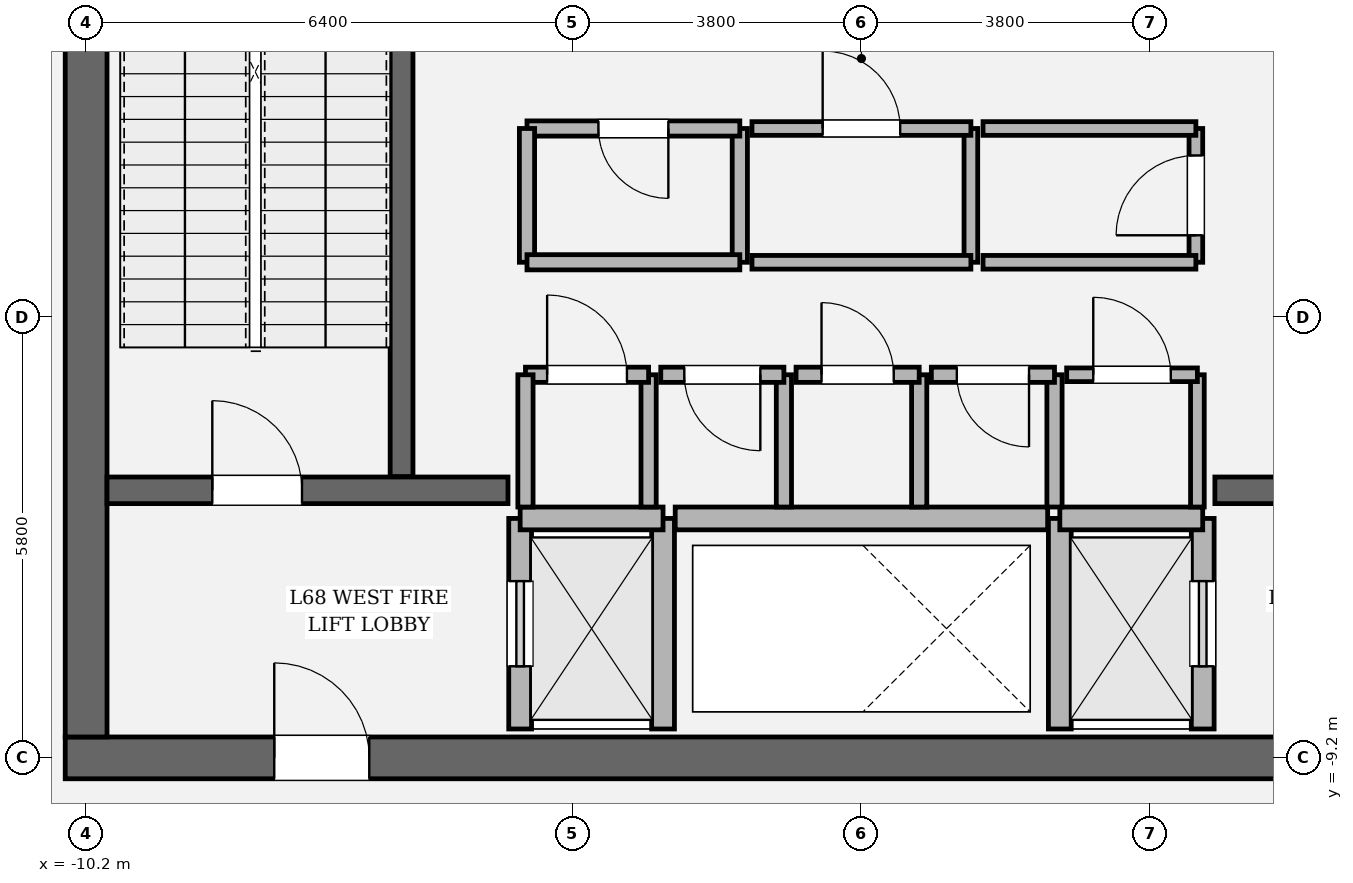
"""IFC4 building model, lengths in metres.
Left out: names, types, materials, properties, quantities, classifications, styles, units other than length and angle.
Written with IfcOpenShell. Run it as: python <this file> out.ifc"""

import sys

from ifc_helpers import new_model, si_unit, direction, frame, frame_2d, origin, place, context, subcontext, project, spatial, rectangle, extrude, element, fill, save


model = new_model("IFC4")
c1 = context("Model", 3, precision=1e-05, world=origin(), true_north=direction((0.0, 1.0)))
c2 = subcontext(c1, "Body", "Model", "MODEL_VIEW")
j1 = project(units=[si_unit("LENGTHUNIT", "METRE"), si_unit("PLANEANGLEUNIT", "RADIAN")], contexts=[c1])
p1 = place(None, origin())
s1 = spatial("IfcSite", under=j1, at=p1, CompositionType="ELEMENT")
p2 = place(p1, origin())
s2 = spatial("IfcBuilding", under=s1, at=p2, CompositionType="ELEMENT")
p3 = place(p2, frame((0.0, 0.0, 288.0)))
s3 = spatial("IfcBuildingStorey", under=s2, at=p3, CompositionType="ELEMENT", Elevation=288.0)
p4 = place(p3, frame((10.475, -9.2, 0.0), z_axis=(0.0, 0.0, 1.0), x_axis=(-1.0, 0.0, 0.0)))
e1 = element("IfcWall", 1, at=p4, inside=s3, PredefinedType="SHEAR", context=c2, shape_type="SweptSolid", body=[
    extrude(rectangle(XDim=20.95, YDim=0.55, at=frame_2d((10.475, 0.0))), origin(), (0.0, 0.0, 1.0), 4.2),
])
p5 = place(p4, frame((2.75, 0.0, 0.0)))
e2 = element("IfcOpeningElement", 2, at=p5, cuts=e1, PredefinedType="OPENING", context=c2, shape_type="SweptSolid", body=[
    extrude(rectangle(XDim=1.25, YDim=2.25, at=frame_2d((0.625, 1.125))), frame((0.0, 0.285, 0.0), z_axis=(0.0, -1.0, 0.0), x_axis=(1.0, 0.0, 0.0)), (0.0, 0.0, 1.0), 0.57),
])
p6 = place(p4, frame((16.95, 0.0, 0.0)))
e3 = element("IfcOpeningElement", 3, at=p6, cuts=e1, PredefinedType="OPENING", context=c2, shape_type="SweptSolid", body=[
    extrude(rectangle(XDim=1.25, YDim=2.25, at=frame_2d((0.625, 1.125))), frame((0.0, 0.285, 0.0), z_axis=(0.0, -1.0, 0.0), x_axis=(1.0, 0.0, 0.0)), (0.0, 0.0, 1.0), 0.57),
])
p7 = place(p3, frame((-10.2, -8.925, 0.0), z_axis=(0.0, 0.0, 1.0), x_axis=(0.0, 1.0, 0.0)))
e4 = element("IfcWall", 4, at=p7, inside=s3, PredefinedType="SHEAR", context=c2, shape_type="SweptSolid", body=[
    extrude(rectangle(XDim=17.85, YDim=0.55, at=frame_2d((8.925, 0.0))), origin(), (0.0, 0.0, 1.0), 4.2),
])
p8 = place(p7, frame((12.715, 0.0, 0.0)))
e5 = element("IfcOpeningElement", 5, at=p8, cuts=e4, PredefinedType="OPENING", context=c2, shape_type="SweptSolid", body=[
    extrude(rectangle(XDim=1.18, YDim=2.2, at=frame_2d((0.59, 1.1))), frame((0.0, 0.285, 0.0), z_axis=(0.0, -1.0, 0.0), x_axis=(1.0, 0.0, 0.0)), (0.0, 0.0, 1.0), 0.57),
])
p9 = place(p3, frame((-6.05, -5.5, 0.0), z_axis=(0.0, 0.0, 1.0), x_axis=(0.0, 1.0, 0.0)))
e6 = element("IfcWall", 6, at=p9, inside=s3, PredefinedType="SOLIDWALL", context=c2, shape_type="SweptSolid", body=[
    extrude(rectangle(XDim=8.95, YDim=0.3, at=frame_2d((4.475, 0.0))), origin(), (0.0, 0.0, 1.0), 4.2),
])
p10 = place(p3, frame((-9.925, -5.68, 0.0), z_axis=(0.0, 0.0, 1.0), x_axis=(1.0, 0.0, 0.0)))
e7 = element("IfcWall", 7, at=p10, inside=s3, PredefinedType="SOLIDWALL", context=c2, shape_type="SweptSolid", body=[
    extrude(rectangle(XDim=5.275, YDim=0.35, at=frame_2d((2.638, 0.0))), origin(), (0.0, 0.0, 1.0), 4.2),
])
p11 = place(p10, frame((1.385, 0.0, 0.0)))
e8 = element("IfcOpeningElement", 8, at=p11, cuts=e7, PredefinedType="OPENING", context=c2, shape_type="SweptSolid", body=[
    extrude(rectangle(XDim=1.18, YDim=2.2, at=frame_2d((0.59, 1.1))), frame((0.0, 0.185, 0.0), z_axis=(0.0, -1.0, 0.0), x_axis=(1.0, 0.0, 0.0)), (0.0, 0.0, 1.0), 0.37),
])
p12 = place(p3, frame((4.65, -5.68, 0.0), z_axis=(0.0, 0.0, 1.0), x_axis=(1.0, 0.0, 0.0)))
e9 = element("IfcWall", 9, at=p12, inside=s3, PredefinedType="SOLIDWALL", context=c2, shape_type="SweptSolid", body=[
    extrude(rectangle(XDim=5.275, YDim=0.35, at=frame_2d((2.638, 0.0))), origin(), (0.0, 0.0, 1.0), 4.2),
])
p13 = place(p12, frame((2.71, 0.0, 0.0)))
e10 = element("IfcOpeningElement", 10, at=p13, cuts=e9, PredefinedType="OPENING", context=c2, shape_type="SweptSolid", body=[
    extrude(rectangle(XDim=1.18, YDim=2.2, at=frame_2d((0.59, 1.1))), frame((0.0, 0.185, 0.0), z_axis=(0.0, -1.0, 0.0), x_axis=(1.0, 0.0, 0.0)), (0.0, 0.0, 1.0), 0.37),
])
p14 = place(p3, frame((-4.49, -8.82, 0.0), z_axis=(0.0, 0.0, 1.0), x_axis=(0.0, 1.0, 0.0)))
e11 = element("IfcWall", 11, at=p14, inside=s3, PredefinedType="SOLIDWALL", context=c2, shape_type="SweptSolid", body=[
    extrude(rectangle(XDim=2.77, YDim=0.3, at=frame_2d((1.385, 0.0))), origin(), (0.0, 0.0, 1.0), 4.0),
])
p15 = place(p14, frame((0.825, 0.0, 0.0)))
e12 = element("IfcOpeningElement", 12, at=p15, cuts=e11, PredefinedType="OPENING", context=c2, shape_type="SweptSolid", body=[
    extrude(rectangle(XDim=1.12, YDim=2.25, at=frame_2d((0.56, 1.125))), frame((0.0, 0.16, 0.0), z_axis=(0.0, -1.0, 0.0), x_axis=(1.0, 0.0, 0.0)), (0.0, 0.0, 1.0), 0.32),
])
p16 = place(p3, frame((-2.61, -8.82, 0.0), z_axis=(0.0, 0.0, 1.0), x_axis=(0.0, 1.0, 0.0)))
e13 = element("IfcWall", 13, at=p16, inside=s3, PredefinedType="SOLIDWALL", context=c2, shape_type="SweptSolid", body=[
    extrude(rectangle(XDim=2.77, YDim=0.3, at=frame_2d((1.385, 0.0))), origin(), (0.0, 0.0, 1.0), 4.0),
])
p17 = place(p3, frame((-4.49, -6.05, 0.0), z_axis=(0.0, 0.0, 1.0), x_axis=(1.0, 0.0, 0.0)))
e14 = element("IfcWall", 14, at=p17, inside=s3, PredefinedType="SOLIDWALL", context=c2, shape_type="SweptSolid", body=[
    extrude(rectangle(XDim=1.88, YDim=0.3, at=frame_2d((0.94, 0.0))), origin(), (0.0, 0.0, 1.0), 4.0),
])
p18 = place(p3, frame((4.49, -8.82, 0.0), z_axis=(0.0, 0.0, 1.0), x_axis=(0.0, 1.0, 0.0)))
e15 = element("IfcWall", 15, at=p18, inside=s3, PredefinedType="SOLIDWALL", context=c2, shape_type="SweptSolid", body=[
    extrude(rectangle(XDim=2.77, YDim=0.3, at=frame_2d((1.385, 0.0))), origin(), (0.0, 0.0, 1.0), 4.0),
])
p19 = place(p18, frame((0.825, 0.0, 0.0)))
e16 = element("IfcOpeningElement", 16, at=p19, cuts=e15, PredefinedType="OPENING", context=c2, shape_type="SweptSolid", body=[
    extrude(rectangle(XDim=1.12, YDim=2.25, at=frame_2d((0.56, 1.125))), frame((0.0, 0.16, 0.0), z_axis=(0.0, -1.0, 0.0), x_axis=(1.0, 0.0, 0.0)), (0.0, 0.0, 1.0), 0.32),
])
p20 = place(p3, frame((2.61, -8.82, 0.0), z_axis=(0.0, 0.0, 1.0), x_axis=(0.0, 1.0, 0.0)))
e17 = element("IfcWall", 17, at=p20, inside=s3, PredefinedType="SOLIDWALL", context=c2, shape_type="SweptSolid", body=[
    extrude(rectangle(XDim=2.77, YDim=0.3, at=frame_2d((1.385, 0.0))), origin(), (0.0, 0.0, 1.0), 4.0),
])
p21 = place(p3, frame((2.61, -6.05, 0.0), z_axis=(0.0, 0.0, 1.0), x_axis=(1.0, 0.0, 0.0)))
e18 = element("IfcWall", 18, at=p21, inside=s3, PredefinedType="SOLIDWALL", context=c2, shape_type="SweptSolid", body=[
    extrude(rectangle(XDim=1.88, YDim=0.3, at=frame_2d((0.94, 0.0))), origin(), (0.0, 0.0, 1.0), 4.0),
])
p22 = place(p3, frame((-2.45, -6.05, 0.0), z_axis=(0.0, 0.0, 1.0), x_axis=(1.0, 0.0, 0.0)))
e19 = element("IfcWall", 19, at=p22, inside=s3, PredefinedType="SOLIDWALL", context=c2, shape_type="SweptSolid", body=[
    extrude(rectangle(XDim=4.9, YDim=0.3, at=frame_2d((2.45, 0.0))), origin(), (0.0, 0.0, 1.0), 4.0),
])
p23 = place(p3, frame((-2.8, -5.9, 0.0), z_axis=(0.0, 0.0, 1.0), x_axis=(0.0, 1.0, 0.0)))
e20 = element("IfcWall", 20, at=p23, inside=s3, PredefinedType="SOLIDWALL", context=c2, shape_type="SweptSolid", body=[
    extrude(rectangle(XDim=1.74, YDim=0.2, at=frame_2d((0.87, 0.0))), origin(), (0.0, 0.0, 1.0), 4.0),
])
p24 = place(p3, frame((-2.8, -4.16, 0.0), z_axis=(0.0, 0.0, 1.0), x_axis=(-1.0, 0.0, 0.0)))
e21 = element("IfcWall", 21, at=p24, inside=s3, PredefinedType="SOLIDWALL", context=c2, shape_type="SweptSolid", body=[
    extrude(rectangle(XDim=1.62, YDim=0.2, at=frame_2d((0.81, 0.0))), origin(), (0.0, 0.0, 1.0), 4.0),
])
p25 = place(p24, frame((0.285, 0.0, 0.0)))
e22 = element("IfcOpeningElement", 22, at=p25, cuts=e21, PredefinedType="OPENING", context=c2, shape_type="SweptSolid", body=[
    extrude(rectangle(XDim=1.05, YDim=2.2, at=frame_2d((0.525, 1.1))), frame((0.0, 0.11, 0.0), z_axis=(0.0, -1.0, 0.0), x_axis=(1.0, 0.0, 0.0)), (0.0, 0.0, 1.0), 0.22),
])
for number, where, z_axis, x_axis in (
    (23, (-4.42, -4.16, 0.0), (0.0, 0.0, 1.0), (0.0, -1.0, 0.0)),
    (24, (-1.02, -5.9, 0.0), (0.0, 0.0, 1.0), (0.0, 1.0, 0.0)),
):
    element("IfcWall", number, at=place(p3, frame(where, z_axis=z_axis, x_axis=x_axis)), inside=s3, PredefinedType="SOLIDWALL", context=c2, shape_type="SweptSolid", body=[
        extrude(rectangle(XDim=1.74, YDim=0.2, at=frame_2d((0.87, 0.0))), origin(), (0.0, 0.0, 1.0), 4.0),
    ])
p26 = place(p3, frame((-1.02, -4.16, 0.0), z_axis=(0.0, 0.0, 1.0), x_axis=(-1.0, 0.0, 0.0)))
e25 = element("IfcWall", 25, at=p26, inside=s3, PredefinedType="SOLIDWALL", context=c2, shape_type="SweptSolid", body=[
    extrude(rectangle(XDim=1.62, YDim=0.2, at=frame_2d((0.81, 0.0))), origin(), (0.0, 0.0, 1.0), 4.0),
])
p27 = place(p26, frame((0.31, 0.0, 0.0)))
e26 = element("IfcOpeningElement", 26, at=p27, cuts=e25, PredefinedType="OPENING", context=c2, shape_type="SweptSolid", body=[
    extrude(rectangle(XDim=1.0, YDim=2.15, at=frame_2d((0.5, 1.075))), frame((0.0, 0.11, 0.0), z_axis=(0.0, -1.0, 0.0), x_axis=(1.0, 0.0, 0.0)), (0.0, 0.0, 1.0), 0.22),
])
p28 = place(p3, frame((0.76, -5.9, 0.0), z_axis=(0.0, 0.0, 1.0), x_axis=(0.0, 1.0, 0.0)))
e27 = element("IfcWall", 27, at=p28, inside=s3, PredefinedType="SOLIDWALL", context=c2, shape_type="SweptSolid", body=[
    extrude(rectangle(XDim=1.74, YDim=0.2, at=frame_2d((0.87, 0.0))), origin(), (0.0, 0.0, 1.0), 4.0),
])
p29 = place(p3, frame((0.76, -4.16, 0.0), z_axis=(0.0, 0.0, 1.0), x_axis=(-1.0, 0.0, 0.0)))
e28 = element("IfcWall", 28, at=p29, inside=s3, PredefinedType="SOLIDWALL", context=c2, shape_type="SweptSolid", body=[
    extrude(rectangle(XDim=1.62, YDim=0.2, at=frame_2d((0.81, 0.0))), origin(), (0.0, 0.0, 1.0), 4.0),
])
p30 = place(p29, frame((0.335, 0.0, 0.0)))
e29 = element("IfcOpeningElement", 29, at=p30, cuts=e28, PredefinedType="OPENING", context=c2, shape_type="SweptSolid", body=[
    extrude(rectangle(XDim=0.95, YDim=2.15, at=frame_2d((0.475, 1.075))), frame((0.0, 0.11, 0.0), z_axis=(0.0, -1.0, 0.0), x_axis=(1.0, 0.0, 0.0)), (0.0, 0.0, 1.0), 0.22),
])
p31 = place(p3, frame((2.54, -5.9, 0.0), z_axis=(0.0, 0.0, 1.0), x_axis=(0.0, 1.0, 0.0)))
e30 = element("IfcWall", 30, at=p31, inside=s3, PredefinedType="SOLIDWALL", context=c2, shape_type="SweptSolid", body=[
    extrude(rectangle(XDim=1.74, YDim=0.2, at=frame_2d((0.87, 0.0))), origin(), (0.0, 0.0, 1.0), 4.0),
])
p32 = place(p3, frame((2.54, -4.16, 0.0), z_axis=(0.0, 0.0, 1.0), x_axis=(-1.0, 0.0, 0.0)))
e31 = element("IfcWall", 31, at=p32, inside=s3, PredefinedType="SOLIDWALL", context=c2, shape_type="SweptSolid", body=[
    extrude(rectangle(XDim=1.62, YDim=0.2, at=frame_2d((0.81, 0.0))), origin(), (0.0, 0.0, 1.0), 4.0),
])
p33 = place(p32, frame((0.335, 0.0, 0.0)))
e32 = element("IfcOpeningElement", 32, at=p33, cuts=e31, PredefinedType="OPENING", context=c2, shape_type="SweptSolid", body=[
    extrude(rectangle(XDim=0.95, YDim=2.15, at=frame_2d((0.475, 1.075))), frame((0.0, 0.11, 0.0), z_axis=(0.0, -1.0, 0.0), x_axis=(1.0, 0.0, 0.0)), (0.0, 0.0, 1.0), 0.22),
])
p34 = place(p3, frame((4.42, -5.9, 0.0), z_axis=(0.0, 0.0, 1.0), x_axis=(0.0, 1.0, 0.0)))
e33 = element("IfcWall", 33, at=p34, inside=s3, PredefinedType="PARTITIONING", context=c2, shape_type="SweptSolid", body=[
    extrude(rectangle(XDim=1.74, YDim=0.18, at=frame_2d((0.87, 0.0))), origin(), (0.0, 0.0, 1.0), 4.0),
])
p35 = place(p3, frame((4.42, -4.16, 0.0), z_axis=(0.0, 0.0, 1.0), x_axis=(-1.0, 0.0, 0.0)))
e34 = element("IfcWall", 34, at=p35, inside=s3, PredefinedType="PARTITIONING", context=c2, shape_type="SweptSolid", body=[
    extrude(rectangle(XDim=1.72, YDim=0.18, at=frame_2d((0.86, 0.0))), origin(), (0.0, 0.0, 1.0), 4.0),
])
p36 = place(p35, frame((0.35, 0.0, 0.0)))
e35 = element("IfcOpeningElement", 35, at=p36, cuts=e34, PredefinedType="OPENING", context=c2, shape_type="SweptSolid", body=[
    extrude(rectangle(XDim=1.02, YDim=2.2, at=frame_2d((0.51, 1.1))), frame((0.0, 0.1, 0.0), z_axis=(0.0, -1.0, 0.0), x_axis=(1.0, 0.0, 0.0)), (0.0, 0.0, 1.0), 0.2),
])
p37 = place(p3, frame((-1.6, -2.68, 0.0), z_axis=(0.0, 0.0, 1.0), x_axis=(0.0, 1.0, 0.0)))
e36 = element("IfcWall", 36, at=p37, inside=s3, PredefinedType="SOLIDWALL", context=c2, shape_type="SweptSolid", body=[
    extrude(rectangle(XDim=1.76, YDim=0.2, at=frame_2d((0.88, 0.0))), origin(), (0.0, 0.0, 1.0), 4.0),
])
p38 = place(p3, frame((-1.6, -0.92, 0.0), z_axis=(0.0, 0.0, 1.0), x_axis=(-1.0, 0.0, 0.0)))
e37 = element("IfcWall", 37, at=p38, inside=s3, PredefinedType="SOLIDWALL", context=c2, shape_type="SweptSolid", body=[
    extrude(rectangle(XDim=2.8, YDim=0.2, at=frame_2d((1.4, 0.0))), origin(), (0.0, 0.0, 1.0), 4.0),
])
p39 = place(p38, frame((0.94, 0.0, 0.0)))
e38 = element("IfcOpeningElement", 38, at=p39, cuts=e37, PredefinedType="OPENING", context=c2, shape_type="SweptSolid", body=[
    extrude(rectangle(XDim=0.92, YDim=2.1, at=frame_2d((0.46, 1.05))), frame((0.0, 0.11, 0.0), z_axis=(0.0, -1.0, 0.0), x_axis=(1.0, 0.0, 0.0)), (0.0, 0.0, 1.0), 0.22),
])
p40 = place(p3, frame((-4.4, -0.92, 0.0), z_axis=(0.0, 0.0, 1.0), x_axis=(0.0, -1.0, 0.0)))
e39 = element("IfcWall", 39, at=p40, inside=s3, PredefinedType="SOLIDWALL", context=c2, shape_type="SweptSolid", body=[
    extrude(rectangle(XDim=1.76, YDim=0.2, at=frame_2d((0.88, 0.0))), origin(), (0.0, 0.0, 1.0), 4.0),
])
p41 = place(p3, frame((-4.4, -2.68, 0.0), z_axis=(0.0, 0.0, 1.0), x_axis=(1.0, 0.0, 0.0)))
e40 = element("IfcWall", 40, at=p41, inside=s3, PredefinedType="SOLIDWALL", context=c2, shape_type="SweptSolid", body=[
    extrude(rectangle(XDim=2.8, YDim=0.2, at=frame_2d((1.4, 0.0))), origin(), (0.0, 0.0, 1.0), 4.0),
])
p42 = place(p3, frame((1.44, -2.68, 0.0), z_axis=(0.0, 0.0, 1.0), x_axis=(0.0, 1.0, 0.0)))
e41 = element("IfcWall", 41, at=p42, inside=s3, PredefinedType="PARTITIONING", context=c2, shape_type="SweptSolid", body=[
    extrude(rectangle(XDim=1.76, YDim=0.18, at=frame_2d((0.88, 0.0))), origin(), (0.0, 0.0, 1.0), 4.0),
])
p43 = place(p3, frame((1.44, -0.92, 0.0), z_axis=(0.0, 0.0, 1.0), x_axis=(-1.0, 0.0, 0.0)))
e42 = element("IfcWall", 42, at=p43, inside=s3, PredefinedType="PARTITIONING", context=c2, shape_type="SweptSolid", body=[
    extrude(rectangle(XDim=2.88, YDim=0.18, at=frame_2d((1.44, 0.0))), origin(), (0.0, 0.0, 1.0), 4.0),
])
p44 = place(p43, frame((0.93, 0.0, 0.0)))
e43 = element("IfcOpeningElement", 43, at=p44, cuts=e42, PredefinedType="OPENING", context=c2, shape_type="SweptSolid", body=[
    extrude(rectangle(XDim=1.02, YDim=2.2, at=frame_2d((0.51, 1.1))), frame((0.0, 0.1, 0.0), z_axis=(0.0, -1.0, 0.0), x_axis=(1.0, 0.0, 0.0)), (0.0, 0.0, 1.0), 0.2),
])
p45 = place(p3, frame((-1.44, -2.68, 0.0), z_axis=(0.0, 0.0, 1.0), x_axis=(1.0, 0.0, 0.0)))
e44 = element("IfcWall", 44, at=p45, inside=s3, PredefinedType="PARTITIONING", context=c2, shape_type="SweptSolid", body=[
    extrude(rectangle(XDim=2.88, YDim=0.18, at=frame_2d((1.44, 0.0))), origin(), (0.0, 0.0, 1.0), 4.0),
])
p46 = place(p3, frame((4.4, -2.68, 0.0), z_axis=(0.0, 0.0, 1.0), x_axis=(0.0, 1.0, 0.0)))
e45 = element("IfcWall", 45, at=p46, inside=s3, PredefinedType="PARTITIONING", context=c2, shape_type="SweptSolid", body=[
    extrude(rectangle(XDim=1.76, YDim=0.18, at=frame_2d((0.88, 0.0))), origin(), (0.0, 0.0, 1.0), 4.0),
])
p47 = place(p46, frame((0.355, 0.0, 0.0)))
e46 = element("IfcOpeningElement", 46, at=p47, cuts=e45, PredefinedType="OPENING", context=c2, shape_type="SweptSolid", body=[
    extrude(rectangle(XDim=1.05, YDim=2.2, at=frame_2d((0.525, 1.1))), frame((0.0, 0.1, 0.0), z_axis=(0.0, -1.0, 0.0), x_axis=(1.0, 0.0, 0.0)), (0.0, 0.0, 1.0), 0.2),
])
for number, where, z_axis, x_axis in (
    (47, (4.4, -0.92, 0.0), (0.0, 0.0, 1.0), (-1.0, 0.0, 0.0)),
    (48, (1.6, -2.68, 0.0), (0.0, 0.0, 1.0), (1.0, 0.0, 0.0)),
):
    element("IfcWall", number, at=place(p3, frame(where, z_axis=z_axis, x_axis=x_axis)), inside=s3, PredefinedType="PARTITIONING", context=c2, shape_type="SweptSolid", body=[
        extrude(rectangle(XDim=2.8, YDim=0.18, at=frame_2d((1.4, 0.0))), origin(), (0.0, 0.0, 1.0), 4.0),
    ])
p48 = place(p11, origin())
e49 = element("IfcDoor", 49, at=p48, inside=s3, OperationType="SINGLE_SWING_LEFT", PredefinedType="DOOR", context=c2, shape_type="SweptSolid", body=[
    extrude(rectangle(XDim=1.18, YDim=2.2, at=frame_2d((0.59, 1.1))), frame((0.0, 0.025, 0.0), z_axis=(0.0, -1.0, 0.0), x_axis=(1.0, 0.0, 0.0)), (0.0, 0.0, 1.0), 0.05),
])
fill(e8, e49)
p49 = place(p6, origin())
e50 = element("IfcDoor", 50, at=p49, inside=s3, OperationType="SINGLE_SWING_RIGHT", PredefinedType="DOOR", context=c2, shape_type="SweptSolid", body=[
    extrude(rectangle(XDim=1.25, YDim=2.25, at=frame_2d((0.625, 1.125))), frame((0.0, 0.025, 0.0), z_axis=(0.0, -1.0, 0.0), x_axis=(1.0, 0.0, 0.0)), (0.0, 0.0, 1.0), 0.05),
])
fill(e3, e50)
p50 = place(p15, origin())
e51 = element("IfcDoor", 51, at=p50, inside=s3, OperationType="SLIDING_TO_LEFT", PredefinedType="DOOR", context=c2, shape_type="SweptSolid", body=[
    extrude(rectangle(XDim=1.12, YDim=2.25, at=frame_2d((0.56, 1.125))), frame((0.0, 0.025, 0.0), z_axis=(0.0, -1.0, 0.0), x_axis=(1.0, 0.0, 0.0)), (0.0, 0.0, 1.0), 0.05),
])
fill(e12, e51)
p51 = place(p19, origin())
e52 = element("IfcDoor", 52, at=p51, inside=s3, OperationType="SLIDING_TO_RIGHT", PredefinedType="DOOR", context=c2, shape_type="SweptSolid", body=[
    extrude(rectangle(XDim=1.12, YDim=2.25, at=frame_2d((0.56, 1.125))), frame((0.0, 0.025, 0.0), z_axis=(0.0, -1.0, 0.0), x_axis=(1.0, 0.0, 0.0)), (0.0, 0.0, 1.0), 0.05),
])
fill(e16, e52)
p52 = place(p25, origin())
e53 = element("IfcDoor", 53, at=p52, inside=s3, OperationType="SINGLE_SWING_RIGHT", PredefinedType="DOOR", context=c2, shape_type="SweptSolid", body=[
    extrude(rectangle(XDim=1.05, YDim=2.2, at=frame_2d((0.525, 1.1))), frame((0.0, 0.025, 0.0), z_axis=(0.0, -1.0, 0.0), x_axis=(1.0, 0.0, 0.0)), (0.0, 0.0, 1.0), 0.05),
])
fill(e22, e53)
p53 = place(p27, origin())
e54 = element("IfcDoor", 54, at=p53, inside=s3, OperationType="SINGLE_SWING_LEFT", PredefinedType="DOOR", context=c2, shape_type="SweptSolid", body=[
    extrude(rectangle(XDim=1.0, YDim=2.15, at=frame_2d((0.5, 1.075))), frame((0.0, 0.025, 0.0), z_axis=(0.0, -1.0, 0.0), x_axis=(1.0, 0.0, 0.0)), (0.0, 0.0, 1.0), 0.05),
])
fill(e26, e54)
p54 = place(p30, origin())
e55 = element("IfcDoor", 55, at=p54, inside=s3, OperationType="SINGLE_SWING_RIGHT", PredefinedType="DOOR", context=c2, shape_type="SweptSolid", body=[
    extrude(rectangle(XDim=0.95, YDim=2.15, at=frame_2d((0.475, 1.075))), frame((0.0, 0.025, 0.0), z_axis=(0.0, -1.0, 0.0), x_axis=(1.0, 0.0, 0.0)), (0.0, 0.0, 1.0), 0.05),
])
fill(e29, e55)
p55 = place(p33, origin())
e56 = element("IfcDoor", 56, at=p55, inside=s3, OperationType="SINGLE_SWING_LEFT", PredefinedType="DOOR", context=c2, shape_type="SweptSolid", body=[
    extrude(rectangle(XDim=0.95, YDim=2.15, at=frame_2d((0.475, 1.075))), frame((0.0, 0.025, 0.0), z_axis=(0.0, -1.0, 0.0), x_axis=(1.0, 0.0, 0.0)), (0.0, 0.0, 1.0), 0.05),
])
fill(e32, e56)
p56 = place(p36, origin())
e57 = element("IfcDoor", 57, at=p56, inside=s3, OperationType="SINGLE_SWING_RIGHT", PredefinedType="DOOR", context=c2, shape_type="SweptSolid", body=[
    extrude(rectangle(XDim=1.02, YDim=2.2, at=frame_2d((0.51, 1.1))), frame((0.0, 0.025, 0.0), z_axis=(0.0, -1.0, 0.0), x_axis=(1.0, 0.0, 0.0)), (0.0, 0.0, 1.0), 0.05),
])
fill(e35, e57)
p57 = place(p39, origin())
e58 = element("IfcDoor", 58, at=p57, inside=s3, OperationType="SINGLE_SWING_LEFT", PredefinedType="DOOR", context=c2, shape_type="SweptSolid", body=[
    extrude(rectangle(XDim=0.92, YDim=2.1, at=frame_2d((0.46, 1.05))), frame((0.0, 0.025, 0.0), z_axis=(0.0, -1.0, 0.0), x_axis=(1.0, 0.0, 0.0)), (0.0, 0.0, 1.0), 0.05),
])
fill(e38, e58)
p58 = place(p44, origin())
e59 = element("IfcDoor", 59, at=p58, inside=s3, OperationType="SINGLE_SWING_RIGHT", PredefinedType="DOOR", context=c2, shape_type="SweptSolid", body=[
    extrude(rectangle(XDim=1.02, YDim=2.2, at=frame_2d((0.51, 1.1))), frame((0.0, 0.025, 0.0), z_axis=(0.0, -1.0, 0.0), x_axis=(1.0, 0.0, 0.0)), (0.0, 0.0, 1.0), 0.05),
])
fill(e43, e59)
p59 = place(p47, origin())
e60 = element("IfcDoor", 60, at=p59, inside=s3, OperationType="SINGLE_SWING_LEFT", PredefinedType="DOOR", context=c2, shape_type="SweptSolid", body=[
    extrude(rectangle(XDim=1.05, YDim=2.2, at=frame_2d((0.525, 1.1))), frame((0.0, 0.025, 0.0), z_axis=(0.0, -1.0, 0.0), x_axis=(1.0, 0.0, 0.0)), (0.0, 0.0, 1.0), 0.05),
])
fill(e46, e60)
save(model, sys.argv[1])
